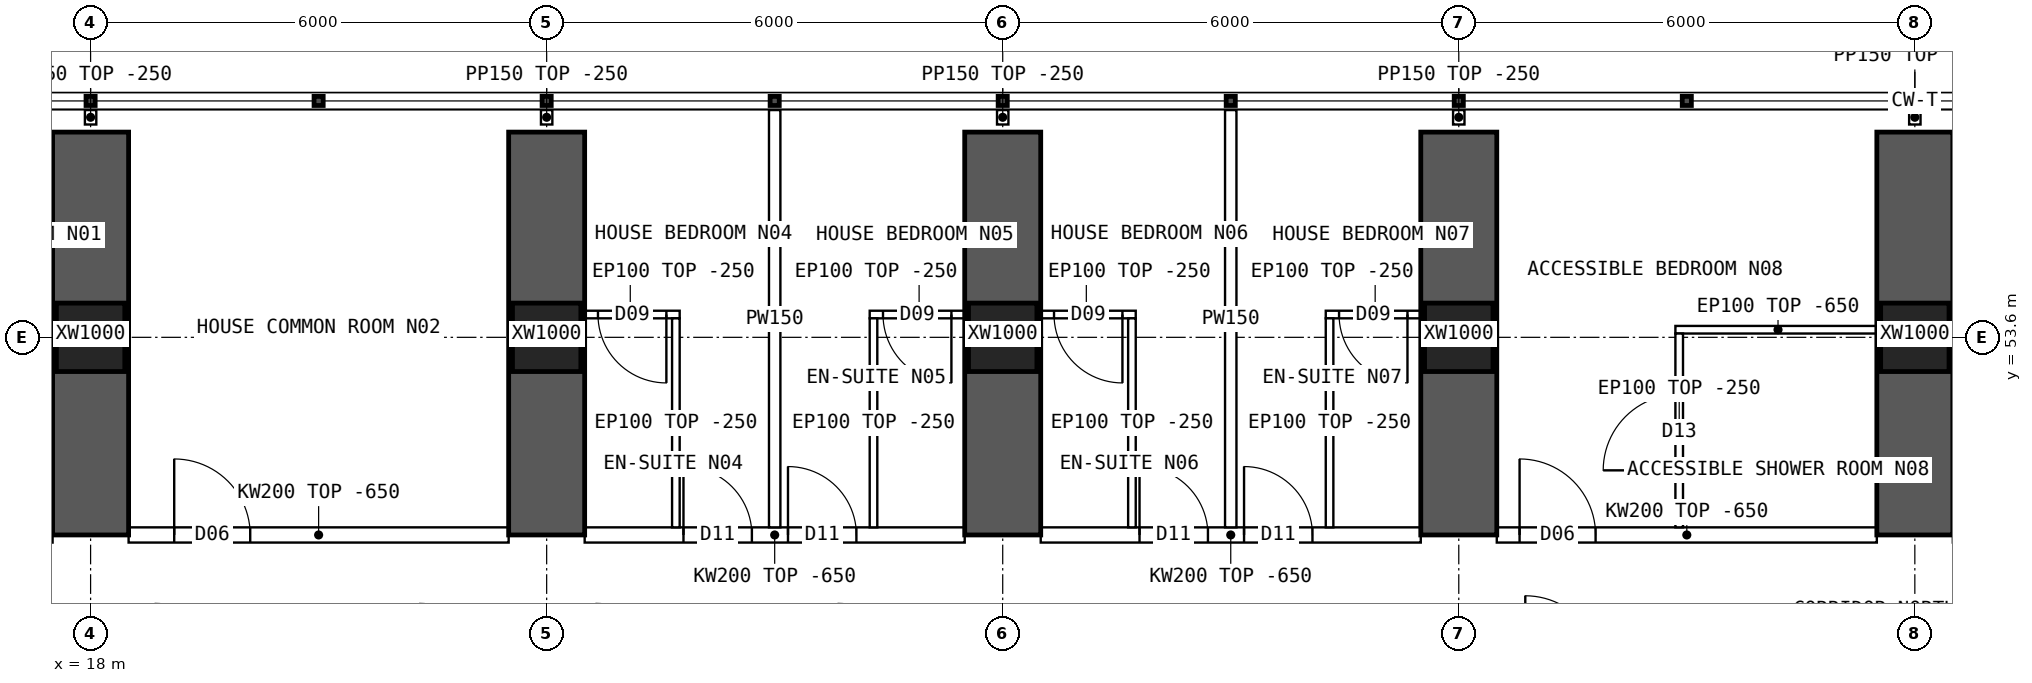
"""IFC4 building model, lengths in metres.
Left out: names, types, materials, properties, quantities, classifications, styles, units other than length and angle.
Written with IfcOpenShell. Run it as: python <this file> out.ifc"""

import sys

from ifc_helpers import new_model, si_unit, direction, frame, frame_2d, origin, origin_2d, place, context, subcontext, project, spatial, polyline, rectangle, hollow_rectangle, outline, extrude, element, fill, save


model = new_model("IFC4")
c1 = context("Model", 3, precision=1e-05, world=origin(), true_north=direction((0.0, 1.0)))
c2 = subcontext(c1, "Body", "Model", "MODEL_VIEW")
j1 = project(units=[si_unit("LENGTHUNIT", "METRE"), si_unit("PLANEANGLEUNIT", "RADIAN")], contexts=[c1])
p1 = place(None, origin())
s1 = spatial("IfcSite", under=j1, at=p1, CompositionType="ELEMENT")
p2 = place(p1, origin())
s2 = spatial("IfcBuilding", under=s1, at=p2, CompositionType="ELEMENT")
p3 = place(p2, frame((0.0, 0.0, 46.45)))
s3 = spatial("IfcBuildingStorey", under=s2, at=p3, CompositionType="ELEMENT", Elevation=46.45)
for number, where, z_axis, x_axis in (
    (1, (18.0, 53.6, 0.0), (0.0, 0.0, 1.0), (1.0, 0.0, 0.0)),
    (2, (24.0, 53.6, 0.0), (0.0, 0.0, 1.0), (1.0, 0.0, 0.0)),
    (3, (30.0, 53.6, 0.0), (0.0, 0.0, 1.0), (1.0, 0.0, 0.0)),
    (4, (36.0, 53.6, 0.0), (0.0, 0.0, 1.0), (1.0, 0.0, 0.0)),
    (5, (42.0, 53.6, 0.0), (0.0, 0.0, 1.0), (1.0, 0.0, 0.0)),
):
    element("IfcColumn", number, at=place(p3, frame(where, z_axis=z_axis, x_axis=x_axis)), inside=s3, PredefinedType="COLUMN", context=c2, shape_type="SweptSolid", body=[
        extrude(hollow_rectangle(XDim=0.9, YDim=0.9, WallThickness=0.09, at=origin_2d()), origin(), (0.0, 0.0, 1.0), 3.75),
    ])
for number, where, z_axis, x_axis in (
    (6, (18.0, 51.0, 0.0), (0.0, 0.0, 1.0), (0.0, 1.0, 0.0)),
    (7, (24.0, 51.0, 0.0), (0.0, 0.0, 1.0), (0.0, 1.0, 0.0)),
    (8, (30.0, 51.0, 0.0), (0.0, 0.0, 1.0), (0.0, 1.0, 0.0)),
    (9, (36.0, 51.0, 0.0), (0.0, 0.0, 1.0), (0.0, 1.0, 0.0)),
    (10, (42.0, 51.0, 0.0), (0.0, 0.0, 1.0), (0.0, 1.0, 0.0)),
):
    element("IfcWall", number, at=place(p3, frame(where, z_axis=z_axis, x_axis=x_axis)), inside=s3, PredefinedType="SHEAR", context=c2, shape_type="SweptSolid", body=[
        extrude(rectangle(XDim=5.3, YDim=1.0, at=frame_2d((2.65, 0.0))), origin(), (0.0, 0.0, 1.0), 3.75),
    ])
p4 = place(p3, frame((18.5, 51.0, 0.0), z_axis=(0.0, 0.0, 1.0), x_axis=(1.0, 0.0, 0.0)))
e11 = element("IfcWall", 11, at=p4, inside=s3, PredefinedType="SOLIDWALL", context=c2, shape_type="SweptSolid", body=[
    extrude(outline(polyline([(0.0, 0.0), (5.0, 0.0), (5.0, 3.1), (0.0, 3.1), (0.0, 0.0)])), frame((0.0, 0.1, 0.0), z_axis=(0.0, -1.0, 0.0), x_axis=(1.0, 0.0, 0.0)), (0.0, 0.0, 1.0), 0.2),
])
p5 = place(p4, frame((0.6, 0.0, 0.0)))
e12 = element("IfcOpeningElement", 12, at=p5, cuts=e11, PredefinedType="OPENING", context=c2, shape_type="SweptSolid", body=[
    extrude(rectangle(XDim=1.0, YDim=2.1, at=frame_2d((0.5, 1.05))), frame((0.0, 0.11, 0.0), z_axis=(0.0, -1.0, 0.0), x_axis=(1.0, 0.0, 0.0)), (0.0, 0.0, 1.0), 0.22),
])
p6 = place(p3, frame((24.5, 51.0, 0.0), z_axis=(0.0, 0.0, 1.0), x_axis=(1.0, 0.0, 0.0)))
e13 = element("IfcWall", 13, at=p6, inside=s3, PredefinedType="SOLIDWALL", context=c2, shape_type="SweptSolid", body=[
    extrude(outline(polyline([(0.0, 0.0), (5.0, 0.0), (5.0, 3.1), (0.0, 3.1), (0.0, 0.0)])), frame((0.0, 0.1, 0.0), z_axis=(0.0, -1.0, 0.0), x_axis=(1.0, 0.0, 0.0)), (0.0, 0.0, 1.0), 0.2),
])
p7 = place(p6, frame((1.3, 0.0, 0.0)))
e14 = element("IfcOpeningElement", 14, at=p7, cuts=e13, PredefinedType="OPENING", context=c2, shape_type="SweptSolid", body=[
    extrude(rectangle(XDim=0.9, YDim=2.1, at=frame_2d((0.45, 1.05))), frame((0.0, 0.11, 0.0), z_axis=(0.0, -1.0, 0.0), x_axis=(1.0, 0.0, 0.0)), (0.0, 0.0, 1.0), 0.22),
])
p8 = place(p6, frame((2.675, 0.0, 0.0)))
e15 = element("IfcOpeningElement", 15, at=p8, cuts=e13, PredefinedType="OPENING", context=c2, shape_type="SweptSolid", body=[
    extrude(rectangle(XDim=0.9, YDim=2.1, at=frame_2d((0.45, 1.05))), frame((0.0, 0.11, 0.0), z_axis=(0.0, -1.0, 0.0), x_axis=(1.0, 0.0, 0.0)), (0.0, 0.0, 1.0), 0.22),
])
p9 = place(p3, frame((30.5, 51.0, 0.0), z_axis=(0.0, 0.0, 1.0), x_axis=(1.0, 0.0, 0.0)))
e16 = element("IfcWall", 16, at=p9, inside=s3, PredefinedType="SOLIDWALL", context=c2, shape_type="SweptSolid", body=[
    extrude(outline(polyline([(0.0, 0.0), (5.0, 0.0), (5.0, 3.1), (0.0, 3.1), (0.0, 0.0)])), frame((0.0, 0.1, 0.0), z_axis=(0.0, -1.0, 0.0), x_axis=(1.0, 0.0, 0.0)), (0.0, 0.0, 1.0), 0.2),
])
p10 = place(p9, frame((1.3, 0.0, 0.0)))
e17 = element("IfcOpeningElement", 17, at=p10, cuts=e16, PredefinedType="OPENING", context=c2, shape_type="SweptSolid", body=[
    extrude(rectangle(XDim=0.9, YDim=2.1, at=frame_2d((0.45, 1.05))), frame((0.0, 0.11, 0.0), z_axis=(0.0, -1.0, 0.0), x_axis=(1.0, 0.0, 0.0)), (0.0, 0.0, 1.0), 0.22),
])
p11 = place(p9, frame((2.675, 0.0, 0.0)))
e18 = element("IfcOpeningElement", 18, at=p11, cuts=e16, PredefinedType="OPENING", context=c2, shape_type="SweptSolid", body=[
    extrude(rectangle(XDim=0.9, YDim=2.1, at=frame_2d((0.45, 1.05))), frame((0.0, 0.11, 0.0), z_axis=(0.0, -1.0, 0.0), x_axis=(1.0, 0.0, 0.0)), (0.0, 0.0, 1.0), 0.22),
])
p12 = place(p3, frame((36.5, 51.0, 0.0), z_axis=(0.0, 0.0, 1.0), x_axis=(1.0, 0.0, 0.0)))
e19 = element("IfcWall", 19, at=p12, inside=s3, PredefinedType="SOLIDWALL", context=c2, shape_type="SweptSolid", body=[
    extrude(outline(polyline([(0.0, 0.0), (5.0, 0.0), (5.0, 3.1), (0.0, 3.1), (0.0, 0.0)])), frame((0.0, 0.1, 0.0), z_axis=(0.0, -1.0, 0.0), x_axis=(1.0, 0.0, 0.0)), (0.0, 0.0, 1.0), 0.2),
])
p13 = place(p12, frame((0.3, 0.0, 0.0)))
e20 = element("IfcOpeningElement", 20, at=p13, cuts=e19, PredefinedType="OPENING", context=c2, shape_type="SweptSolid", body=[
    extrude(rectangle(XDim=1.0, YDim=2.1, at=frame_2d((0.5, 1.05))), frame((0.0, 0.11, 0.0), z_axis=(0.0, -1.0, 0.0), x_axis=(1.0, 0.0, 0.0)), (0.0, 0.0, 1.0), 0.22),
])
p14 = place(p3, frame((16.25, 53.9, 0.0), z_axis=(0.0, 0.0, 1.0), x_axis=(1.0, 0.0, 0.0)))
e21 = element("IfcWall", 21, at=p14, inside=s3, PredefinedType="PARTITIONING", context=c2, shape_type="SweptSolid", body=[
    extrude(rectangle(XDim=1.3, YDim=0.1, at=frame_2d((0.65, 0.0))), origin(), (0.0, 0.0, 1.0), 3.5),
])
p15 = place(p14, frame((0.175, 0.0, 0.0)))
e22 = element("IfcOpeningElement", 22, at=p15, cuts=e21, PredefinedType="OPENING", context=c2, shape_type="SweptSolid", body=[
    extrude(rectangle(XDim=0.9, YDim=2.1, at=frame_2d((0.45, 1.05))), frame((0.0, 0.06, 0.0), z_axis=(0.0, -1.0, 0.0), x_axis=(1.0, 0.0, 0.0)), (0.0, 0.0, 1.0), 0.12),
])
p16 = place(p3, frame((27.0, 56.59, 0.0), z_axis=(0.0, 0.0, 1.0), x_axis=(0.0, -1.0, 0.0)))
e23 = element("IfcWall", 23, at=p16, inside=s3, PredefinedType="PARTITIONING", context=c2, shape_type="SweptSolid", body=[
    extrude(outline(polyline([(0.0, 0.0), (5.49, 0.0), (5.49, 3.1), (5.442, 3.1), (5.44, 3.5), (3.192, 3.5), (3.19, 3.1), (2.792, 3.1), (2.79, 3.5), (0.0, 3.5), (0.0, 0.0)])), frame((0.0, 0.075, 0.0), z_axis=(0.0, -1.0, 0.0), x_axis=(1.0, 0.0, 0.0)), (0.0, 0.0, 1.0), 0.15),
])
p17 = place(p3, frame((24.45, 53.9, 0.0), z_axis=(0.0, 0.0, 1.0), x_axis=(1.0, 0.0, 0.0)))
e24 = element("IfcWall", 24, at=p17, inside=s3, PredefinedType="PARTITIONING", context=c2, shape_type="SweptSolid", body=[
    extrude(rectangle(XDim=1.3, YDim=0.1, at=frame_2d((0.65, 0.0))), origin(), (0.0, 0.0, 1.0), 3.5),
])
p18 = place(p17, frame((0.225, 0.0, 0.0)))
e25 = element("IfcOpeningElement", 25, at=p18, cuts=e24, PredefinedType="OPENING", context=c2, shape_type="SweptSolid", body=[
    extrude(rectangle(XDim=0.9, YDim=2.1, at=frame_2d((0.45, 1.05))), frame((0.0, 0.06, 0.0), z_axis=(0.0, -1.0, 0.0), x_axis=(1.0, 0.0, 0.0)), (0.0, 0.0, 1.0), 0.12),
])
p19 = place(p3, frame((25.7, 53.85, 0.0), z_axis=(0.0, 0.0, 1.0), x_axis=(0.0, -1.0, 0.0)))
e26 = element("IfcWall", 26, at=p19, inside=s3, PredefinedType="PARTITIONING", context=c2, shape_type="SweptSolid", body=[
    extrude(outline(polyline([(0.0, 0.0), (2.75, 0.0), (2.75, 3.1), (2.702, 3.1), (2.7, 3.5), (0.452, 3.5), (0.45, 3.1), (0.0, 3.1), (0.0, 0.0)])), frame((0.0, 0.05, 0.0), z_axis=(0.0, -1.0, 0.0), x_axis=(1.0, 0.0, 0.0)), (0.0, 0.0, 1.0), 0.1),
])
p20 = place(p3, frame((28.25, 53.9, 0.0), z_axis=(0.0, 0.0, 1.0), x_axis=(1.0, 0.0, 0.0)))
e27 = element("IfcWall", 27, at=p20, inside=s3, PredefinedType="PARTITIONING", context=c2, shape_type="SweptSolid", body=[
    extrude(rectangle(XDim=1.3, YDim=0.1, at=frame_2d((0.65, 0.0))), origin(), (0.0, 0.0, 1.0), 3.5),
])
p21 = place(p20, frame((0.175, 0.0, 0.0)))
e28 = element("IfcOpeningElement", 28, at=p21, cuts=e27, PredefinedType="OPENING", context=c2, shape_type="SweptSolid", body=[
    extrude(rectangle(XDim=0.9, YDim=2.1, at=frame_2d((0.45, 1.05))), frame((0.0, 0.06, 0.0), z_axis=(0.0, -1.0, 0.0), x_axis=(1.0, 0.0, 0.0)), (0.0, 0.0, 1.0), 0.12),
])
p22 = place(p3, frame((28.3, 53.85, 0.0), z_axis=(0.0, 0.0, 1.0), x_axis=(0.0, -1.0, 0.0)))
e29 = element("IfcWall", 29, at=p22, inside=s3, PredefinedType="PARTITIONING", context=c2, shape_type="SweptSolid", body=[
    extrude(outline(polyline([(0.0, 0.0), (2.75, 0.0), (2.75, 3.1), (2.702, 3.1), (2.7, 3.5), (0.452, 3.5), (0.45, 3.1), (0.0, 3.1), (0.0, 0.0)])), frame((0.0, 0.05, 0.0), z_axis=(0.0, -1.0, 0.0), x_axis=(1.0, 0.0, 0.0)), (0.0, 0.0, 1.0), 0.1),
])
p23 = place(p3, frame((33.0, 56.59, 0.0), z_axis=(0.0, 0.0, 1.0), x_axis=(0.0, -1.0, 0.0)))
e30 = element("IfcWall", 30, at=p23, inside=s3, PredefinedType="PARTITIONING", context=c2, shape_type="SweptSolid", body=[
    extrude(outline(polyline([(0.0, 0.0), (5.49, 0.0), (5.49, 3.1), (5.442, 3.1), (5.44, 3.5), (3.192, 3.5), (3.19, 3.1), (2.792, 3.1), (2.79, 3.5), (0.0, 3.5), (0.0, 0.0)])), frame((0.0, 0.075, 0.0), z_axis=(0.0, -1.0, 0.0), x_axis=(1.0, 0.0, 0.0)), (0.0, 0.0, 1.0), 0.15),
])
p24 = place(p3, frame((30.45, 53.9, 0.0), z_axis=(0.0, 0.0, 1.0), x_axis=(1.0, 0.0, 0.0)))
e31 = element("IfcWall", 31, at=p24, inside=s3, PredefinedType="PARTITIONING", context=c2, shape_type="SweptSolid", body=[
    extrude(rectangle(XDim=1.3, YDim=0.1, at=frame_2d((0.65, 0.0))), origin(), (0.0, 0.0, 1.0), 3.5),
])
p25 = place(p24, frame((0.225, 0.0, 0.0)))
e32 = element("IfcOpeningElement", 32, at=p25, cuts=e31, PredefinedType="OPENING", context=c2, shape_type="SweptSolid", body=[
    extrude(rectangle(XDim=0.9, YDim=2.1, at=frame_2d((0.45, 1.05))), frame((0.0, 0.06, 0.0), z_axis=(0.0, -1.0, 0.0), x_axis=(1.0, 0.0, 0.0)), (0.0, 0.0, 1.0), 0.12),
])
p26 = place(p3, frame((31.7, 53.85, 0.0), z_axis=(0.0, 0.0, 1.0), x_axis=(0.0, -1.0, 0.0)))
e33 = element("IfcWall", 33, at=p26, inside=s3, PredefinedType="PARTITIONING", context=c2, shape_type="SweptSolid", body=[
    extrude(outline(polyline([(0.0, 0.0), (2.75, 0.0), (2.75, 3.1), (2.702, 3.1), (2.7, 3.5), (0.452, 3.5), (0.45, 3.1), (0.0, 3.1), (0.0, 0.0)])), frame((0.0, 0.05, 0.0), z_axis=(0.0, -1.0, 0.0), x_axis=(1.0, 0.0, 0.0)), (0.0, 0.0, 1.0), 0.1),
])
p27 = place(p3, frame((34.25, 53.9, 0.0), z_axis=(0.0, 0.0, 1.0), x_axis=(1.0, 0.0, 0.0)))
e34 = element("IfcWall", 34, at=p27, inside=s3, PredefinedType="PARTITIONING", context=c2, shape_type="SweptSolid", body=[
    extrude(rectangle(XDim=1.3, YDim=0.1, at=frame_2d((0.65, 0.0))), origin(), (0.0, 0.0, 1.0), 3.5),
])
p28 = place(p27, frame((0.175, 0.0, 0.0)))
e35 = element("IfcOpeningElement", 35, at=p28, cuts=e34, PredefinedType="OPENING", context=c2, shape_type="SweptSolid", body=[
    extrude(rectangle(XDim=0.9, YDim=2.1, at=frame_2d((0.45, 1.05))), frame((0.0, 0.06, 0.0), z_axis=(0.0, -1.0, 0.0), x_axis=(1.0, 0.0, 0.0)), (0.0, 0.0, 1.0), 0.12),
])
p29 = place(p3, frame((34.3, 53.85, 0.0), z_axis=(0.0, 0.0, 1.0), x_axis=(0.0, -1.0, 0.0)))
e36 = element("IfcWall", 36, at=p29, inside=s3, PredefinedType="PARTITIONING", context=c2, shape_type="SweptSolid", body=[
    extrude(outline(polyline([(0.0, 0.0), (2.75, 0.0), (2.75, 3.1), (2.702, 3.1), (2.7, 3.5), (0.452, 3.5), (0.45, 3.1), (0.0, 3.1), (0.0, 0.0)])), frame((0.0, 0.05, 0.0), z_axis=(0.0, -1.0, 0.0), x_axis=(1.0, 0.0, 0.0)), (0.0, 0.0, 1.0), 0.1),
])
p30 = place(p3, frame((38.85, 53.7, 0.0), z_axis=(0.0, 0.0, 1.0), x_axis=(1.0, 0.0, 0.0)))
e37 = element("IfcWall", 37, at=p30, inside=s3, PredefinedType="PARTITIONING", context=c2, shape_type="SweptSolid", body=[
    extrude(outline(polyline([(0.0, 0.0), (2.7, 0.0), (2.7, 3.1), (0.0, 3.1), (0.0, 0.0)])), frame((0.0, 0.05, 0.0), z_axis=(0.0, -1.0, 0.0), x_axis=(1.0, 0.0, 0.0)), (0.0, 0.0, 1.0), 0.1),
])
p31 = place(p3, frame((38.9, 53.65, 0.0), z_axis=(0.0, 0.0, 1.0), x_axis=(0.0, -1.0, 0.0)))
e38 = element("IfcWall", 38, at=p31, inside=s3, PredefinedType="PARTITIONING", context=c2, shape_type="SweptSolid", body=[
    extrude(outline(polyline([(0.0, 0.0), (2.55, 0.0), (2.55, 3.1), (2.502, 3.1), (2.5, 3.5), (0.252, 3.5), (0.25, 3.1), (0.0, 3.1), (0.0, 0.0)])), frame((0.0, 0.05, 0.0), z_axis=(0.0, -1.0, 0.0), x_axis=(1.0, 0.0, 0.0)), (0.0, 0.0, 1.0), 0.1),
])
p32 = place(p31, frame((0.8, 0.0, 0.0)))
e39 = element("IfcOpeningElement", 39, at=p32, cuts=e38, PredefinedType="OPENING", context=c2, shape_type="SweptSolid", body=[
    extrude(rectangle(XDim=1.0, YDim=2.1, at=frame_2d((0.5, 1.05))), frame((0.0, 0.06, 0.0), z_axis=(0.0, -1.0, 0.0), x_axis=(1.0, 0.0, 0.0)), (0.0, 0.0, 1.0), 0.12),
])
for number, where, z_axis, x_axis in (
    (40, (18.0, 56.4, 0.0), (0.0, 0.0, 1.0), (0.0, 1.0, 0.0)),
    (41, (24.0, 56.4, 0.0), (0.0, 0.0, 1.0), (0.0, 1.0, 0.0)),
    (42, (30.0, 56.4, 0.0), (0.0, 0.0, 1.0), (0.0, 1.0, 0.0)),
    (43, (36.0, 56.4, 0.0), (0.0, 0.0, 1.0), (0.0, 1.0, 0.0)),
    (44, (42.0, 56.4, 0.0), (0.0, 0.0, 1.0), (0.0, 1.0, 0.0)),
):
    element("IfcWall", number, at=place(p3, frame(where, z_axis=z_axis, x_axis=x_axis)), inside=s3, PredefinedType="PARTITIONING", context=c2, shape_type="SweptSolid", body=[
        extrude(rectangle(XDim=0.19, YDim=0.15, at=frame_2d((0.095, 0.0))), origin(), (0.0, 0.0, 1.0), 3.5),
    ])
p33 = place(p5, origin())
e45 = element("IfcDoor", 45, at=p33, inside=s3, OperationType="SINGLE_SWING_LEFT", PredefinedType="DOOR", context=c2, shape_type="SweptSolid", body=[
    extrude(rectangle(XDim=1.0, YDim=2.1, at=frame_2d((0.5, 1.05))), frame((0.0, 0.025, 0.0), z_axis=(0.0, -1.0, 0.0), x_axis=(1.0, 0.0, 0.0)), (0.0, 0.0, 1.0), 0.05),
])
fill(e12, e45)
p34 = place(p18, origin())
e46 = element("IfcDoor", 46, at=p34, inside=s3, OperationType="SINGLE_SWING_RIGHT", PredefinedType="DOOR", context=c2, shape_type="SweptSolid", body=[
    extrude(rectangle(XDim=0.9, YDim=2.1, at=frame_2d((0.45, 1.05))), frame((0.0, 0.025, 0.0), z_axis=(0.0, -1.0, 0.0), x_axis=(1.0, 0.0, 0.0)), (0.0, 0.0, 1.0), 0.05),
])
fill(e25, e46)
p35 = place(p7, origin())
e47 = element("IfcDoor", 47, at=p35, inside=s3, OperationType="SINGLE_SWING_LEFT", PredefinedType="DOOR", context=c2, shape_type="SweptSolid", body=[
    extrude(rectangle(XDim=0.9, YDim=2.1, at=frame_2d((0.45, 1.05))), frame((0.0, 0.025, 0.0), z_axis=(0.0, -1.0, 0.0), x_axis=(1.0, 0.0, 0.0)), (0.0, 0.0, 1.0), 0.05),
])
fill(e14, e47)
p36 = place(p21, origin())
e48 = element("IfcDoor", 48, at=p36, inside=s3, OperationType="SINGLE_SWING_RIGHT", PredefinedType="DOOR", context=c2, shape_type="SweptSolid", body=[
    extrude(rectangle(XDim=0.9, YDim=2.1, at=frame_2d((0.45, 1.05))), frame((0.0, 0.025, 0.0), z_axis=(0.0, -1.0, 0.0), x_axis=(1.0, 0.0, 0.0)), (0.0, 0.0, 1.0), 0.05),
])
fill(e28, e48)
p37 = place(p8, origin())
e49 = element("IfcDoor", 49, at=p37, inside=s3, OperationType="SINGLE_SWING_LEFT", PredefinedType="DOOR", context=c2, shape_type="SweptSolid", body=[
    extrude(rectangle(XDim=0.9, YDim=2.1, at=frame_2d((0.45, 1.05))), frame((0.0, 0.025, 0.0), z_axis=(0.0, -1.0, 0.0), x_axis=(1.0, 0.0, 0.0)), (0.0, 0.0, 1.0), 0.05),
])
fill(e15, e49)
p38 = place(p25, origin())
e50 = element("IfcDoor", 50, at=p38, inside=s3, OperationType="SINGLE_SWING_RIGHT", PredefinedType="DOOR", context=c2, shape_type="SweptSolid", body=[
    extrude(rectangle(XDim=0.9, YDim=2.1, at=frame_2d((0.45, 1.05))), frame((0.0, 0.025, 0.0), z_axis=(0.0, -1.0, 0.0), x_axis=(1.0, 0.0, 0.0)), (0.0, 0.0, 1.0), 0.05),
])
fill(e32, e50)
p39 = place(p10, origin())
e51 = element("IfcDoor", 51, at=p39, inside=s3, OperationType="SINGLE_SWING_LEFT", PredefinedType="DOOR", context=c2, shape_type="SweptSolid", body=[
    extrude(rectangle(XDim=0.9, YDim=2.1, at=frame_2d((0.45, 1.05))), frame((0.0, 0.025, 0.0), z_axis=(0.0, -1.0, 0.0), x_axis=(1.0, 0.0, 0.0)), (0.0, 0.0, 1.0), 0.05),
])
fill(e17, e51)
p40 = place(p28, origin())
e52 = element("IfcDoor", 52, at=p40, inside=s3, OperationType="SINGLE_SWING_RIGHT", PredefinedType="DOOR", context=c2, shape_type="SweptSolid", body=[
    extrude(rectangle(XDim=0.9, YDim=2.1, at=frame_2d((0.45, 1.05))), frame((0.0, 0.025, 0.0), z_axis=(0.0, -1.0, 0.0), x_axis=(1.0, 0.0, 0.0)), (0.0, 0.0, 1.0), 0.05),
])
fill(e35, e52)
p41 = place(p11, origin())
e53 = element("IfcDoor", 53, at=p41, inside=s3, OperationType="SINGLE_SWING_LEFT", PredefinedType="DOOR", context=c2, shape_type="SweptSolid", body=[
    extrude(rectangle(XDim=0.9, YDim=2.1, at=frame_2d((0.45, 1.05))), frame((0.0, 0.025, 0.0), z_axis=(0.0, -1.0, 0.0), x_axis=(1.0, 0.0, 0.0)), (0.0, 0.0, 1.0), 0.05),
])
fill(e18, e53)
p42 = place(p32, origin())
e54 = element("IfcDoor", 54, at=p42, inside=s3, OperationType="SINGLE_SWING_RIGHT", PredefinedType="DOOR", context=c2, shape_type="SweptSolid", body=[
    extrude(rectangle(XDim=1.0, YDim=2.1, at=frame_2d((0.5, 1.05))), frame((0.0, 0.025, 0.0), z_axis=(0.0, -1.0, 0.0), x_axis=(1.0, 0.0, 0.0)), (0.0, 0.0, 1.0), 0.05),
])
fill(e39, e54)
p43 = place(p13, origin())
e55 = element("IfcDoor", 55, at=p43, inside=s3, OperationType="SINGLE_SWING_LEFT", PredefinedType="DOOR", context=c2, shape_type="SweptSolid", body=[
    extrude(rectangle(XDim=1.0, YDim=2.1, at=frame_2d((0.5, 1.05))), frame((0.0, 0.025, 0.0), z_axis=(0.0, -1.0, 0.0), x_axis=(1.0, 0.0, 0.0)), (0.0, 0.0, 1.0), 0.05),
])
fill(e20, e55)
save(model, sys.argv[1])
